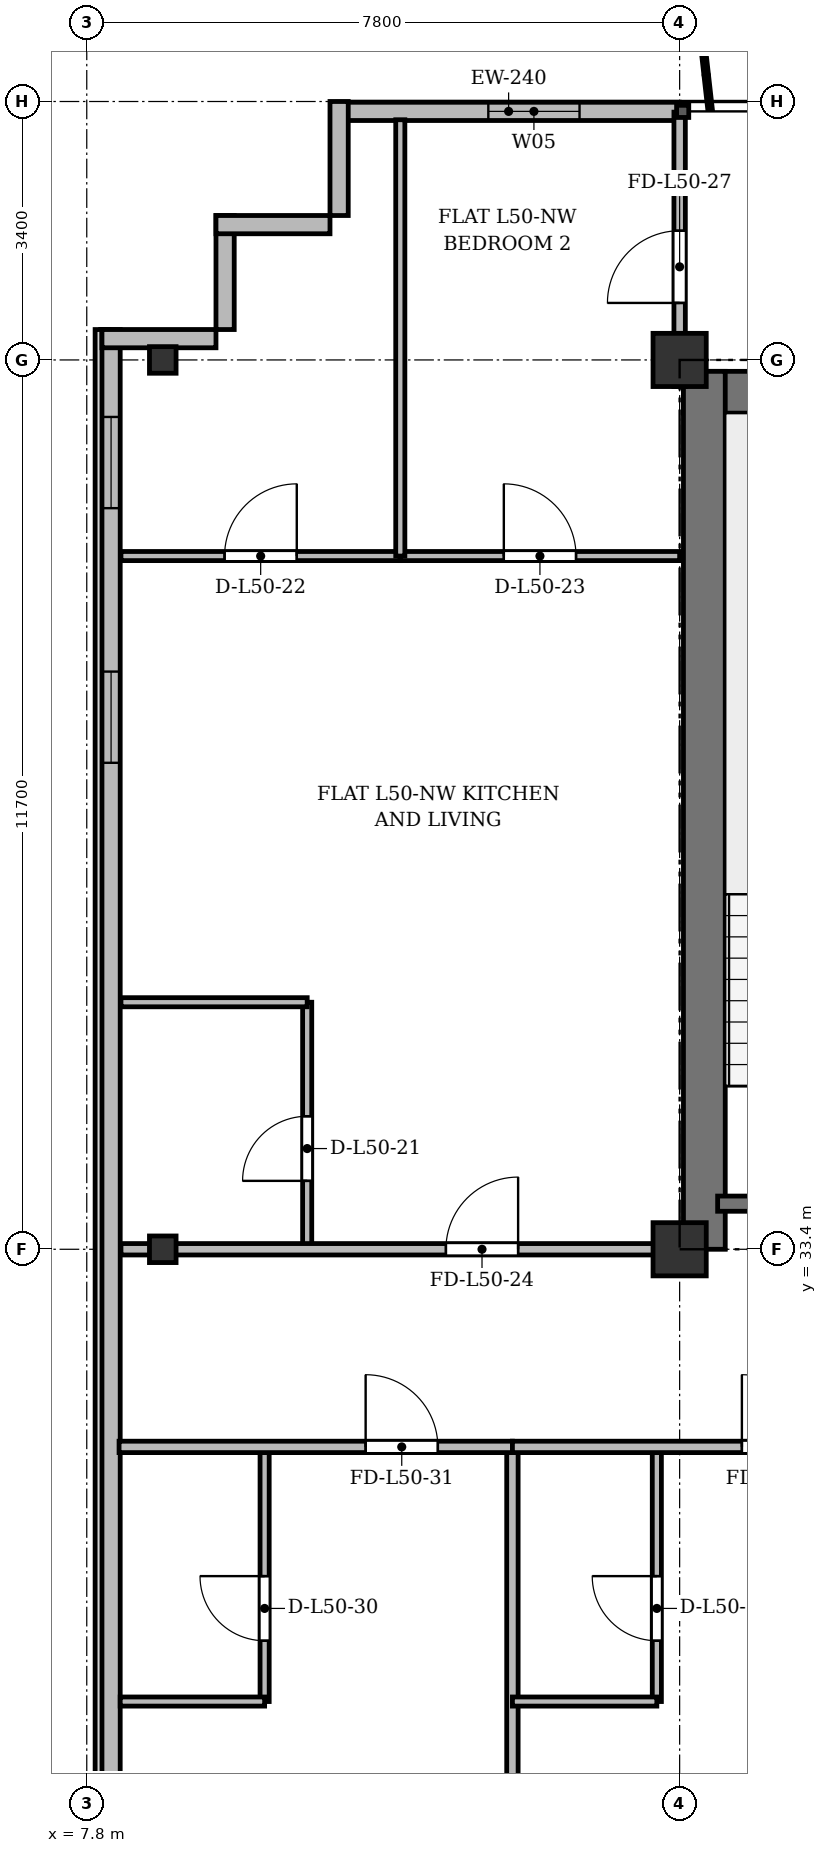
"""IFC4 building model, lengths in metres.
Left out: names, types, materials, properties, quantities, classifications, styles, units other than length and angle.
Written with IfcOpenShell. Run it as: python <this file> out.ifc"""

import sys

from ifc_helpers import new_model, si_unit, direction, frame, frame_2d, origin, origin_2d, place, context, subcontext, project, spatial, rectangle, i_section, extrude, source, transform, mapped, element, fill, save


model = new_model("IFC4")
c1 = context("Model", 3, precision=1e-05, world=origin(), true_north=direction((0.0, 1.0)))
c2 = subcontext(c1, "Body", "Model", "MODEL_VIEW")
j1 = project(units=[si_unit("LENGTHUNIT", "METRE"), si_unit("PLANEANGLEUNIT", "RADIAN")], contexts=[c1])
p1 = place(None, origin())
s1 = spatial("IfcSite", under=j1, at=p1, CompositionType="ELEMENT")
p2 = place(p1, origin())
s2 = spatial("IfcBuilding", under=s1, at=p2, CompositionType="ELEMENT")
p3 = place(p2, frame((0.0, 0.0, 194.1)))
s3 = spatial("IfcBuildingStorey", under=s2, at=p3, CompositionType="ELEMENT", Elevation=194.1)
m1 = source(origin(), c2, "Body", "SweptSolid", [
    extrude(i_section(OverallWidth=0.35, OverallDepth=0.35, WebThickness=0.018, FlangeThickness=0.028, at=origin_2d()), origin(), (0.0, 0.0, 1.0), 3.6),
])
for number, where, z_axis, x_axis in (
    (1, (8.8, 33.4, 0.0), (0.0, 0.0, 1.0), (1.0, 0.0, 0.0)),
    (2, (8.8, 45.1, 0.0), (0.0, 0.0, 1.0), (1.0, 0.0, 0.0)),
):
    element("IfcColumn", number, at=place(p3, frame(where, z_axis=z_axis, x_axis=x_axis)), inside=s3, PredefinedType="COLUMN", context=c2, shape_type="MappedRepresentation", body=[
        mapped(m1, transform((0.0, 0.0, 0.0), x_axis=(1.0, 0.0, 0.0), y_axis=(0.0, 1.0, 0.0), z_axis=(0.0, 0.0, 1.0), scale=1.0)),
    ])
m2 = source(origin(), c2, "Body", "SweptSolid", [
    extrude(rectangle(XDim=0.7, YDim=0.7, at=origin_2d()), origin(), (0.0, 0.0, 1.0), 3.6),
])
for number, where, z_axis, x_axis in (
    (3, (15.6, 33.4, 0.0), (0.0, 0.0, 1.0), (1.0, 0.0, 0.0)),
    (4, (15.6, 45.1, 0.0), (0.0, 0.0, 1.0), (1.0, 0.0, 0.0)),
):
    element("IfcColumn", number, at=place(p3, frame(where, z_axis=z_axis, x_axis=x_axis)), inside=s3, PredefinedType="COLUMN", context=c2, shape_type="MappedRepresentation", body=[
        mapped(m2, transform((0.0, 0.0, 0.0), x_axis=(1.0, 0.0, 0.0), y_axis=(0.0, 1.0, 0.0), z_axis=(0.0, 0.0, 1.0), scale=1.0)),
    ])
p4 = place(p3, frame((11.1, 48.37, 0.0), z_axis=(0.0, 0.0, 1.0), x_axis=(1.0, 0.0, 0.0)))
e5 = element("IfcWall", 5, at=p4, inside=s3, PredefinedType="SOLIDWALL", context=c2, shape_type="SweptSolid", body=[
    extrude(rectangle(XDim=4.5, YDim=0.24, at=frame_2d((2.25, 0.0))), origin(), (0.0, 0.0, 1.0), 3.36),
])
p5 = place(p4, frame((1.983, 0.0, 0.9)))
e6 = element("IfcOpeningElement", 6, at=p5, cuts=e5, PredefinedType="OPENING", context=c2, shape_type="SweptSolid", body=[
    extrude(rectangle(XDim=1.2, YDim=1.65, at=frame_2d((0.6, 0.825))), frame((0.0, 0.13, 0.0), z_axis=(0.0, -1.0, 0.0), x_axis=(1.0, 0.0, 0.0)), (0.0, 0.0, 1.0), 0.26),
])
p6 = place(p3, frame((8.12, 6.4, 0.0), z_axis=(0.0, 0.0, 1.0), x_axis=(0.0, 1.0, 0.0)))
e7 = element("IfcWall", 7, at=p6, inside=s3, PredefinedType="SOLIDWALL", context=c2, shape_type="SweptSolid", body=[
    extrude(rectangle(XDim=39.1, YDim=0.24, at=frame_2d((19.55, 0.0))), origin(), (0.0, 0.0, 1.0), 3.36),
])
p7 = place(p6, frame((1.45, 0.0, 0.92)))
e8 = element("IfcOpeningElement", 8, at=p7, cuts=e7, PredefinedType="OPENING", context=c2, shape_type="SweptSolid", body=[
    extrude(rectangle(XDim=1.2, YDim=1.65, at=frame_2d((0.6, 0.825))), frame((0.0, 0.13, 0.0), z_axis=(0.0, -1.0, 0.0), x_axis=(1.0, 0.0, 0.0)), (0.0, 0.0, 1.0), 0.26),
])
p8 = place(p6, frame((3.7, 0.0, 0.92)))
e9 = element("IfcOpeningElement", 9, at=p8, cuts=e7, PredefinedType="OPENING", context=c2, shape_type="SweptSolid", body=[
    extrude(rectangle(XDim=2.6, YDim=1.9, at=frame_2d((1.3, 0.95))), frame((0.0, 0.13, 0.0), z_axis=(0.0, -1.0, 0.0), x_axis=(1.0, 0.0, 0.0)), (0.0, 0.0, 1.0), 0.26),
])
p9 = place(p6, frame((7.9, 0.0, 0.92)))
e10 = element("IfcOpeningElement", 10, at=p9, cuts=e7, PredefinedType="OPENING", context=c2, shape_type="SweptSolid", body=[
    extrude(rectangle(XDim=2.6, YDim=1.9, at=frame_2d((1.3, 0.95))), frame((0.0, 0.13, 0.0), z_axis=(0.0, -1.0, 0.0), x_axis=(1.0, 0.0, 0.0)), (0.0, 0.0, 1.0), 0.26),
])
p10 = place(p6, frame((15.1, 0.0, 0.92)))
e11 = element("IfcOpeningElement", 11, at=p10, cuts=e7, PredefinedType="OPENING", context=c2, shape_type="SweptSolid", body=[
    extrude(rectangle(XDim=2.6, YDim=1.9, at=frame_2d((1.3, 0.95))), frame((0.0, 0.13, 0.0), z_axis=(0.0, -1.0, 0.0), x_axis=(1.0, 0.0, 0.0)), (0.0, 0.0, 1.0), 0.26),
])
p11 = place(p6, frame((33.4, 0.0, 0.92)))
e12 = element("IfcOpeningElement", 12, at=p11, cuts=e7, PredefinedType="OPENING", context=c2, shape_type="SweptSolid", body=[
    extrude(rectangle(XDim=1.2, YDim=1.65, at=frame_2d((0.6, 0.825))), frame((0.0, 0.13, 0.0), z_axis=(0.0, -1.0, 0.0), x_axis=(1.0, 0.0, 0.0)), (0.0, 0.0, 1.0), 0.26),
])
p12 = place(p6, frame((36.75, 0.0, 0.92)))
e13 = element("IfcOpeningElement", 13, at=p12, cuts=e7, PredefinedType="OPENING", context=c2, shape_type="SweptSolid", body=[
    extrude(rectangle(XDim=1.2, YDim=1.65, at=frame_2d((0.6, 0.825))), frame((0.0, 0.13, 0.0), z_axis=(0.0, -1.0, 0.0), x_axis=(1.0, 0.0, 0.0)), (0.0, 0.0, 1.0), 0.26),
])
for number, where, z_axis, x_axis in (
    (14, (8.0, 45.38, 0.0), (0.0, 0.0, 1.0), (1.0, 0.0, 0.0)),
    (15, (9.62, 45.5, 0.0), (0.0, 0.0, 1.0), (0.0, 1.0, 0.0)),
    (16, (9.5, 46.88, 0.0), (0.0, 0.0, 1.0), (1.0, 0.0, 0.0)),
    (17, (11.12, 47.0, 0.0), (0.0, 0.0, 1.0), (0.0, 1.0, 0.0)),
):
    element("IfcWall", number, at=place(p3, frame(where, z_axis=z_axis, x_axis=x_axis)), inside=s3, PredefinedType="SOLIDWALL", context=c2, shape_type="SweptSolid", body=[
        extrude(rectangle(XDim=1.5, YDim=0.24, at=frame_2d((0.75, 0.0))), origin(), (0.0, 0.0, 1.0), 3.36),
    ])
p13 = place(p3, frame((15.65, 44.675, 0.0), z_axis=(0.0, 0.0, 1.0), x_axis=(1.0, 0.0, 0.0)))
e18 = element("IfcWall", 18, at=p13, inside=s3, PredefinedType="SHEAR", context=c2, shape_type="SweptSolid", body=[
    extrude(rectangle(XDim=43.1, YDim=0.55, at=frame_2d((21.55, 0.0))), origin(), (0.0, 0.0, 1.0), 3.36),
])
p14 = place(p3, frame((15.925, 33.4, 0.0), z_axis=(0.0, 0.0, 1.0), x_axis=(0.0, 1.0, 0.0)))
e19 = element("IfcWall", 19, at=p14, inside=s3, PredefinedType="SHEAR", context=c2, shape_type="SweptSolid", body=[
    extrude(rectangle(XDim=11.55, YDim=0.55, at=frame_2d((5.775, 0.0))), origin(), (0.0, 0.0, 1.0), 3.36),
])
p15 = place(p3, frame((16.1, 34.0, 0.0), z_axis=(0.0, 0.0, 1.0), x_axis=(1.0, 0.0, 0.0)))
e20 = element("IfcWall", 20, at=p15, inside=s3, PredefinedType="SHEAR", context=c2, shape_type="SweptSolid", body=[
    extrude(rectangle(XDim=3.4, YDim=0.2, at=frame_2d((1.7, 0.0))), origin(), (0.0, 0.0, 1.0), 3.36),
])
p16 = place(p3, frame((10.7, 33.4, 0.0), z_axis=(0.0, 0.0, 1.0), x_axis=(0.0, 1.0, 0.0)))
e21 = element("IfcWall", 21, at=p16, inside=s3, PredefinedType="PARTITIONING", context=c2, shape_type="SweptSolid", body=[
    extrude(rectangle(XDim=3.25, YDim=0.12, at=frame_2d((1.625, 0.0))), origin(), (0.0, 0.0, 1.0), 2.91),
])
p17 = place(p16, frame((0.9, 0.0, 0.0)))
e22 = element("IfcOpeningElement", 22, at=p17, cuts=e21, PredefinedType="OPENING", context=c2, shape_type="SweptSolid", body=[
    extrude(rectangle(XDim=0.85, YDim=2.1, at=frame_2d((0.425, 1.05))), frame((0.0, 0.07, 0.0), z_axis=(0.0, -1.0, 0.0), x_axis=(1.0, 0.0, 0.0)), (0.0, 0.0, 1.0), 0.14),
])
p18 = place(p3, frame((8.25, 36.65, 0.0), z_axis=(0.0, 0.0, 1.0), x_axis=(1.0, 0.0, 0.0)))
e23 = element("IfcWall", 23, at=p18, inside=s3, PredefinedType="PARTITIONING", context=c2, shape_type="SweptSolid", body=[
    extrude(rectangle(XDim=2.45, YDim=0.12, at=frame_2d((1.225, 0.0))), origin(), (0.0, 0.0, 1.0), 2.86),
])
p19 = place(p3, frame((8.25, 42.52, 0.0), z_axis=(0.0, 0.0, 1.0), x_axis=(1.0, 0.0, 0.0)))
e24 = element("IfcWall", 24, at=p19, inside=s3, PredefinedType="PARTITIONING", context=c2, shape_type="SweptSolid", body=[
    extrude(rectangle(XDim=3.675, YDim=0.12, at=frame_2d((1.837, 0.0))), origin(), (0.0, 0.0, 1.0), 2.86),
])
p20 = place(p19, frame((1.363, 0.0, 0.0)))
e25 = element("IfcOpeningElement", 25, at=p20, cuts=e24, PredefinedType="OPENING", context=c2, shape_type="SweptSolid", body=[
    extrude(rectangle(XDim=0.95, YDim=2.15, at=frame_2d((0.475, 1.075))), frame((0.0, 0.07, 0.0), z_axis=(0.0, -1.0, 0.0), x_axis=(1.0, 0.0, 0.0)), (0.0, 0.0, 1.0), 0.14),
])
p21 = place(p3, frame((11.925, 42.52, 0.0), z_axis=(0.0, 0.0, 1.0), x_axis=(1.0, 0.0, 0.0)))
e26 = element("IfcWall", 26, at=p21, inside=s3, PredefinedType="PARTITIONING", context=c2, shape_type="SweptSolid", body=[
    extrude(rectangle(XDim=3.675, YDim=0.12, at=frame_2d((1.837, 0.0))), origin(), (0.0, 0.0, 1.0), 2.86),
])
p22 = place(p21, frame((1.362, 0.0, 0.0)))
e27 = element("IfcOpeningElement", 27, at=p22, cuts=e26, PredefinedType="OPENING", context=c2, shape_type="SweptSolid", body=[
    extrude(rectangle(XDim=0.95, YDim=2.15, at=frame_2d((0.475, 1.075))), frame((0.0, 0.07, 0.0), z_axis=(0.0, -1.0, 0.0), x_axis=(1.0, 0.0, 0.0)), (0.0, 0.0, 1.0), 0.14),
])
p23 = place(p3, frame((11.925, 42.52, 0.0), z_axis=(0.0, 0.0, 1.0), x_axis=(0.0, 1.0, 0.0)))
e28 = element("IfcWall", 28, at=p23, inside=s3, PredefinedType="PARTITIONING", context=c2, shape_type="SweptSolid", body=[
    extrude(rectangle(XDim=5.74, YDim=0.12, at=frame_2d((2.87, 0.0))), origin(), (0.0, 0.0, 1.0), 2.91),
])
p24 = place(p3, frame((8.25, 33.4, 0.0), z_axis=(0.0, 0.0, 1.0), x_axis=(1.0, 0.0, 0.0)))
e29 = element("IfcWall", 29, at=p24, inside=s3, PredefinedType="PARTITIONING", context=c2, shape_type="SweptSolid", body=[
    extrude(rectangle(XDim=7.35, YDim=0.15, at=frame_2d((3.675, 0.0))), origin(), (0.0, 0.0, 1.0), 2.91),
])
p25 = place(p24, frame((4.275, 0.0, 0.0)))
e30 = element("IfcOpeningElement", 30, at=p25, cuts=e29, PredefinedType="OPENING", context=c2, shape_type="SweptSolid", body=[
    extrude(rectangle(XDim=0.95, YDim=2.15, at=frame_2d((0.475, 1.075))), frame((0.0, 0.085, 0.0), z_axis=(0.0, -1.0, 0.0), x_axis=(1.0, 0.0, 0.0)), (0.0, 0.0, 1.0), 0.17),
])
p26 = place(p3, frame((15.6, 44.75, 0.0), z_axis=(0.0, 0.0, 1.0), x_axis=(0.0, 1.0, 0.0)))
e31 = element("IfcWall", 31, at=p26, inside=s3, PredefinedType="PARTITIONING", context=c2, shape_type="SweptSolid", body=[
    extrude(rectangle(XDim=3.61, YDim=0.15, at=frame_2d((1.805, 0.0))), origin(), (0.0, 0.0, 1.0), 2.86),
])
p27 = place(p26, frame((1.1, 0.0, 0.0)))
e32 = element("IfcOpeningElement", 32, at=p27, cuts=e31, PredefinedType="OPENING", context=c2, shape_type="SweptSolid", body=[
    extrude(rectangle(XDim=0.95, YDim=2.15, at=frame_2d((0.475, 1.075))), frame((0.0, 0.085, 0.0), z_axis=(0.0, -1.0, 0.0), x_axis=(1.0, 0.0, 0.0)), (0.0, 0.0, 1.0), 0.17),
])
p28 = place(p3, frame((13.4, 3.625, 0.0), z_axis=(0.0, 0.0, 1.0), x_axis=(0.0, 1.0, 0.0)))
e33 = element("IfcWall", 33, at=p28, inside=s3, PredefinedType="PARTITIONING", context=c2, shape_type="SweptSolid", body=[
    extrude(rectangle(XDim=27.175, YDim=0.15, at=frame_2d((13.587, 0.0))), origin(), (0.0, 0.0, 1.0), 2.91),
])
p29 = place(p3, frame((10.14, 27.45, 0.0), z_axis=(0.0, 0.0, 1.0), x_axis=(0.0, 1.0, 0.0)))
e34 = element("IfcWall", 34, at=p29, inside=s3, PredefinedType="PARTITIONING", context=c2, shape_type="SweptSolid", body=[
    extrude(rectangle(XDim=3.35, YDim=0.12, at=frame_2d((1.675, 0.0))), origin(), (0.0, 0.0, 1.0), 3.36),
])
p30 = place(p29, frame((0.8, 0.0, 0.0)))
e35 = element("IfcOpeningElement", 35, at=p30, cuts=e34, PredefinedType="OPENING", context=c2, shape_type="SweptSolid", body=[
    extrude(rectangle(XDim=0.85, YDim=2.1, at=frame_2d((0.425, 1.05))), frame((0.0, 0.07, 0.0), z_axis=(0.0, -1.0, 0.0), x_axis=(1.0, 0.0, 0.0)), (0.0, 0.0, 1.0), 0.14),
])
p31 = place(p3, frame((8.24, 27.45, 0.0), z_axis=(0.0, 0.0, 1.0), x_axis=(1.0, 0.0, 0.0)))
e36 = element("IfcWall", 36, at=p31, inside=s3, PredefinedType="PARTITIONING", context=c2, shape_type="SweptSolid", body=[
    extrude(rectangle(XDim=1.9, YDim=0.12, at=frame_2d((0.95, 0.0))), origin(), (0.0, 0.0, 1.0), 2.86),
])
p32 = place(p3, frame((8.225, 30.8, 0.0), z_axis=(0.0, 0.0, 1.0), x_axis=(1.0, 0.0, 0.0)))
e37 = element("IfcWall", 37, at=p32, inside=s3, PredefinedType="PARTITIONING", context=c2, shape_type="SweptSolid", body=[
    extrude(rectangle(XDim=5.175, YDim=0.15, at=frame_2d((2.587, 0.0))), origin(), (0.0, 0.0, 1.0), 2.86),
])
p33 = place(p32, frame((3.244, 0.0, 0.0)))
e38 = element("IfcOpeningElement", 38, at=p33, cuts=e37, PredefinedType="OPENING", context=c2, shape_type="SweptSolid", body=[
    extrude(rectangle(XDim=0.95, YDim=2.15, at=frame_2d((0.475, 1.075))), frame((0.0, 0.085, 0.0), z_axis=(0.0, -1.0, 0.0), x_axis=(1.0, 0.0, 0.0)), (0.0, 0.0, 1.0), 0.17),
])
p34 = place(p3, frame((15.3, 27.45, 0.0), z_axis=(0.0, 0.0, 1.0), x_axis=(0.0, 1.0, 0.0)))
e39 = element("IfcWall", 39, at=p34, inside=s3, PredefinedType="PARTITIONING", context=c2, shape_type="SweptSolid", body=[
    extrude(rectangle(XDim=3.35, YDim=0.12, at=frame_2d((1.675, 0.0))), origin(), (0.0, 0.0, 1.0), 3.36),
])
p35 = place(p34, frame((0.8, 0.0, 0.0)))
e40 = element("IfcOpeningElement", 40, at=p35, cuts=e39, PredefinedType="OPENING", context=c2, shape_type="SweptSolid", body=[
    extrude(rectangle(XDim=0.85, YDim=2.1, at=frame_2d((0.425, 1.05))), frame((0.0, 0.07, 0.0), z_axis=(0.0, -1.0, 0.0), x_axis=(1.0, 0.0, 0.0)), (0.0, 0.0, 1.0), 0.14),
])
p36 = place(p3, frame((13.4, 27.45, 0.0), z_axis=(0.0, 0.0, 1.0), x_axis=(1.0, 0.0, 0.0)))
e41 = element("IfcWall", 41, at=p36, inside=s3, PredefinedType="PARTITIONING", context=c2, shape_type="SweptSolid", body=[
    extrude(rectangle(XDim=1.9, YDim=0.12, at=frame_2d((0.95, 0.0))), origin(), (0.0, 0.0, 1.0), 3.36),
])
p37 = place(p3, frame((13.4, 30.8, 0.0), z_axis=(0.0, 0.0, 1.0), x_axis=(1.0, 0.0, 0.0)))
e42 = element("IfcWall", 42, at=p37, inside=s3, PredefinedType="PARTITIONING", context=c2, shape_type="SweptSolid", body=[
    extrude(rectangle(XDim=4.8, YDim=0.15, at=frame_2d((2.4, 0.0))), origin(), (0.0, 0.0, 1.0), 2.86),
])
p38 = place(p37, frame((3.019, 0.0, 0.0)))
e43 = element("IfcOpeningElement", 43, at=p38, cuts=e42, PredefinedType="OPENING", context=c2, shape_type="SweptSolid", body=[
    extrude(rectangle(XDim=0.95, YDim=2.15, at=frame_2d((0.475, 1.075))), frame((0.0, 0.085, 0.0), z_axis=(0.0, -1.0, 0.0), x_axis=(1.0, 0.0, 0.0)), (0.0, 0.0, 1.0), 0.17),
])
m3 = source(origin(), c2, "Body", "SweptSolid", [
    extrude(rectangle(XDim=1.2, YDim=1.65, at=frame_2d((0.6, 0.825))), frame((0.0, 0.03, 0.0), z_axis=(0.0, -1.0, 0.0), x_axis=(1.0, 0.0, 0.0)), (0.0, 0.0, 1.0), 0.06),
])
p39 = place(p5, origin())
e44 = element("IfcWindow", 44, at=p39, inside=s3, PartitioningType="SINGLE_PANEL", PredefinedType="WINDOW", context=c2, shape_type="MappedRepresentation", body=[
    mapped(m3, transform((0.0, 0.0, 0.0), x_axis=(1.0, 0.0, 0.0), y_axis=(0.0, 1.0, 0.0), z_axis=(0.0, 0.0, 1.0), scale=1.0)),
])
fill(e6, e44)
p40 = place(p11, origin())
e45 = element("IfcWindow", 45, at=p40, inside=s3, PartitioningType="SINGLE_PANEL", PredefinedType="WINDOW", context=c2, shape_type="MappedRepresentation", body=[
    mapped(m3, transform((0.0, 0.0, 0.0), x_axis=(1.0, 0.0, 0.0), y_axis=(0.0, 1.0, 0.0), z_axis=(0.0, 0.0, 1.0), scale=1.0)),
])
fill(e12, e45)
p41 = place(p12, origin())
e46 = element("IfcWindow", 46, at=p41, inside=s3, PartitioningType="SINGLE_PANEL", PredefinedType="WINDOW", context=c2, shape_type="MappedRepresentation", body=[
    mapped(m3, transform((0.0, 0.0, 0.0), x_axis=(1.0, 0.0, 0.0), y_axis=(0.0, 1.0, 0.0), z_axis=(0.0, 0.0, 1.0), scale=1.0)),
])
fill(e13, e46)
m4 = source(origin(), c2, "Body", "SweptSolid", [
    extrude(rectangle(XDim=0.85, YDim=2.1, at=frame_2d((0.425, 1.05))), frame((0.0, 0.025, 0.0), z_axis=(0.0, -1.0, 0.0), x_axis=(1.0, 0.0, 0.0)), (0.0, 0.0, 1.0), 0.05),
])
p42 = place(p17, origin())
e47 = element("IfcDoor", 47, at=p42, inside=s3, OperationType="SINGLE_SWING_LEFT", PredefinedType="DOOR", context=c2, shape_type="MappedRepresentation", body=[
    mapped(m4, transform((0.0, 0.0, 0.0), x_axis=(1.0, 0.0, 0.0), y_axis=(0.0, 1.0, 0.0), z_axis=(0.0, 0.0, 1.0), scale=1.0)),
])
fill(e22, e47)
m5 = source(origin(), c2, "Body", "SweptSolid", [
    extrude(rectangle(XDim=0.95, YDim=2.15, at=frame_2d((0.475, 1.075))), frame((0.0, 0.025, 0.0), z_axis=(0.0, -1.0, 0.0), x_axis=(1.0, 0.0, 0.0)), (0.0, 0.0, 1.0), 0.05),
])
p43 = place(p20, origin())
e48 = element("IfcDoor", 48, at=p43, inside=s3, OperationType="SINGLE_SWING_RIGHT", PredefinedType="DOOR", context=c2, shape_type="MappedRepresentation", body=[
    mapped(m5, transform((0.0, 0.0, 0.0), x_axis=(1.0, 0.0, 0.0), y_axis=(0.0, 1.0, 0.0), z_axis=(0.0, 0.0, 1.0), scale=1.0)),
])
fill(e25, e48)
p44 = place(p22, origin())
e49 = element("IfcDoor", 49, at=p44, inside=s3, OperationType="SINGLE_SWING_LEFT", PredefinedType="DOOR", context=c2, shape_type="MappedRepresentation", body=[
    mapped(m5, transform((0.0, 0.0, 0.0), x_axis=(1.0, 0.0, 0.0), y_axis=(0.0, 1.0, 0.0), z_axis=(0.0, 0.0, 1.0), scale=1.0)),
])
fill(e27, e49)
p45 = place(p25, origin())
e50 = element("IfcDoor", 50, at=p45, inside=s3, OperationType="SINGLE_SWING_RIGHT", PredefinedType="DOOR", context=c2, shape_type="MappedRepresentation", body=[
    mapped(m5, transform((0.0, 0.0, 0.0), x_axis=(1.0, 0.0, 0.0), y_axis=(0.0, 1.0, 0.0), z_axis=(0.0, 0.0, 1.0), scale=1.0)),
])
fill(e30, e50)
p46 = place(p27, origin())
e51 = element("IfcDoor", 51, at=p46, inside=s3, OperationType="SINGLE_SWING_LEFT", PredefinedType="DOOR", context=c2, shape_type="MappedRepresentation", body=[
    mapped(m5, transform((0.0, 0.0, 0.0), x_axis=(1.0, 0.0, 0.0), y_axis=(0.0, 1.0, 0.0), z_axis=(0.0, 0.0, 1.0), scale=1.0)),
])
fill(e32, e51)
p47 = place(p30, origin())
e52 = element("IfcDoor", 52, at=p47, inside=s3, OperationType="SINGLE_SWING_RIGHT", PredefinedType="DOOR", context=c2, shape_type="MappedRepresentation", body=[
    mapped(m4, transform((0.0, 0.0, 0.0), x_axis=(1.0, 0.0, 0.0), y_axis=(0.0, 1.0, 0.0), z_axis=(0.0, 0.0, 1.0), scale=1.0)),
])
fill(e35, e52)
p48 = place(p33, origin())
e53 = element("IfcDoor", 53, at=p48, inside=s3, OperationType="SINGLE_SWING_LEFT", PredefinedType="DOOR", context=c2, shape_type="MappedRepresentation", body=[
    mapped(m5, transform((0.0, 0.0, 0.0), x_axis=(1.0, 0.0, 0.0), y_axis=(0.0, 1.0, 0.0), z_axis=(0.0, 0.0, 1.0), scale=1.0)),
])
fill(e38, e53)
p49 = place(p35, origin())
e54 = element("IfcDoor", 54, at=p49, inside=s3, OperationType="SINGLE_SWING_RIGHT", PredefinedType="DOOR", context=c2, shape_type="MappedRepresentation", body=[
    mapped(m4, transform((0.0, 0.0, 0.0), x_axis=(1.0, 0.0, 0.0), y_axis=(0.0, 1.0, 0.0), z_axis=(0.0, 0.0, 1.0), scale=1.0)),
])
fill(e40, e54)
p50 = place(p38, origin())
e55 = element("IfcDoor", 55, at=p50, inside=s3, OperationType="SINGLE_SWING_LEFT", PredefinedType="DOOR", context=c2, shape_type="MappedRepresentation", body=[
    mapped(m5, transform((0.0, 0.0, 0.0), x_axis=(1.0, 0.0, 0.0), y_axis=(0.0, 1.0, 0.0), z_axis=(0.0, 0.0, 1.0), scale=1.0)),
])
fill(e43, e55)
save(model, sys.argv[1])
